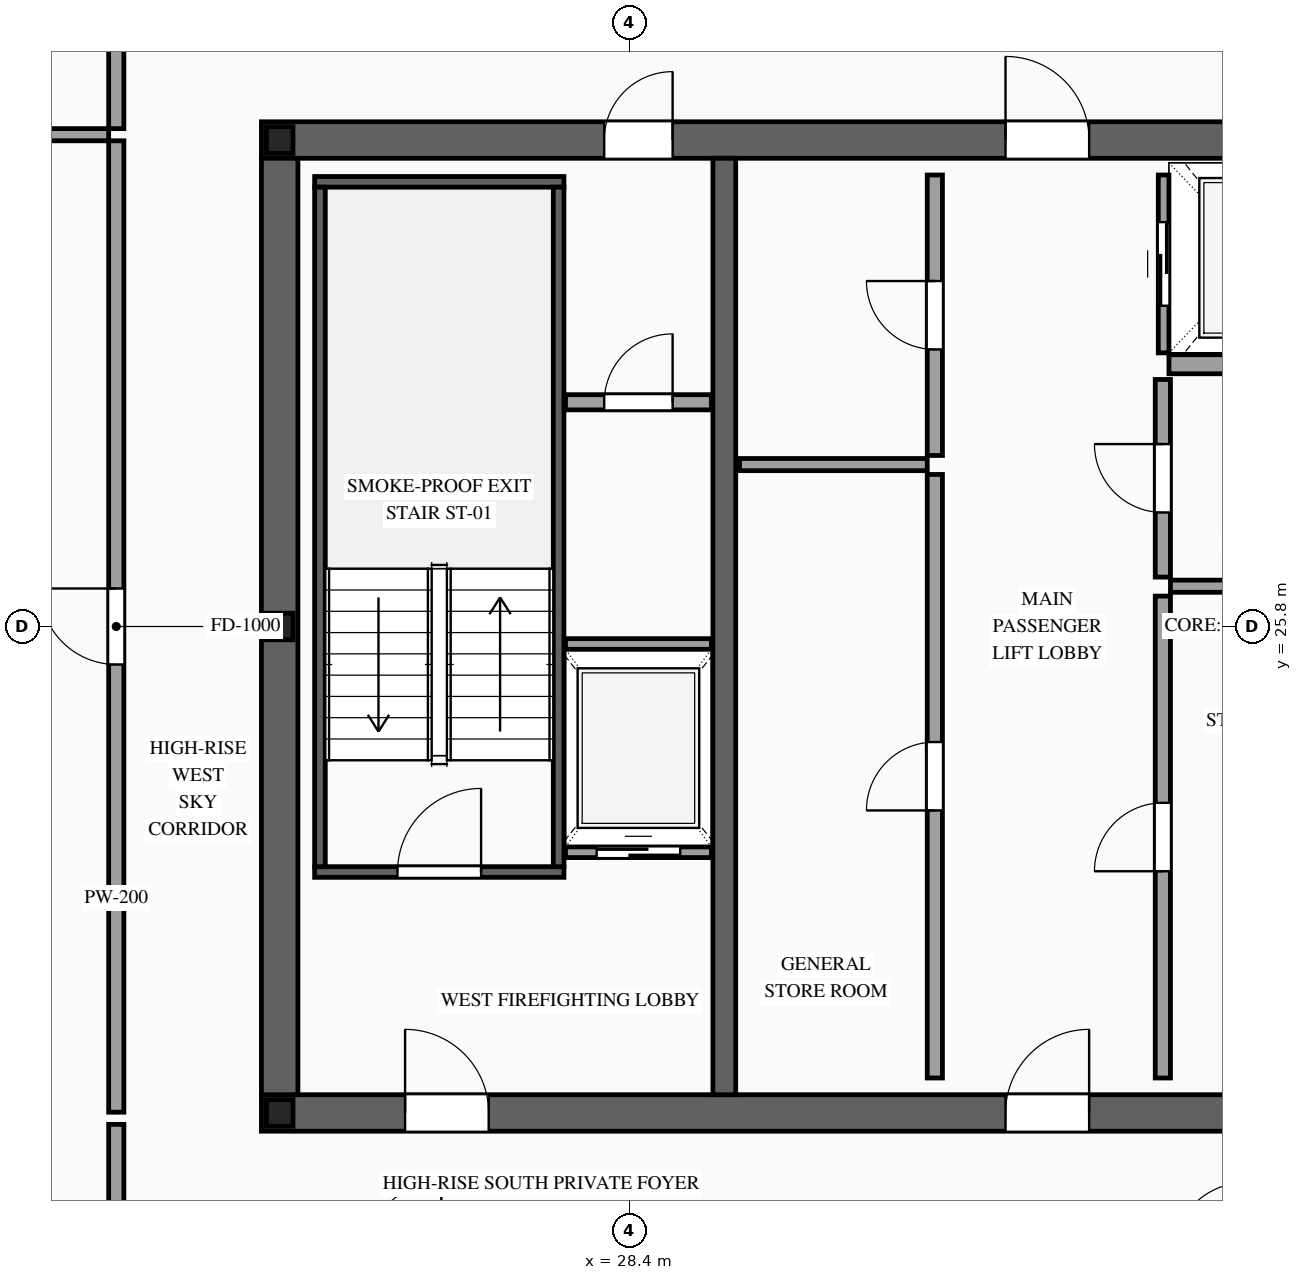
"""IFC4 building model, lengths in metres.
Left out: names, types, materials, properties, quantities, classifications, styles, units other than length and angle.
Written with IfcOpenShell. Run it as: python <this file> out.ifc"""

import sys

from ifc_helpers import new_model, si_unit, direction, frame, frame_2d, origin, origin_2d, place, context, subcontext, project, spatial, rectangle, i_section, extrude, source, transform, mapped, element, fill, save


model = new_model("IFC4")
c1 = context("Model", 3, precision=1e-05, world=origin(), true_north=direction((0.0, 1.0)))
c2 = subcontext(c1, "Body", "Model", "MODEL_VIEW")
j1 = project(units=[si_unit("LENGTHUNIT", "METRE"), si_unit("PLANEANGLEUNIT", "RADIAN")], contexts=[c1])
p1 = place(None, origin())
s1 = spatial("IfcSite", under=j1, at=p1, CompositionType="ELEMENT")
p2 = place(p1, origin())
s2 = spatial("IfcBuilding", under=s1, at=p2, CompositionType="ELEMENT")
p3 = place(p2, frame((0.0, 0.0, 318.2)))
s3 = spatial("IfcBuildingStorey", under=s2, at=p3, CompositionType="ELEMENT", Elevation=318.2)
p4 = place(p3, frame((23.56, 19.4, 0.0), z_axis=(0.0, 0.0, 1.0), x_axis=(1.0, 0.0, 0.0)))
e1 = element("IfcWall", 1, at=p4, inside=s3, PredefinedType="SHEAR", context=c2, shape_type="SweptSolid", body=[
    extrude(rectangle(XDim=26.88, YDim=0.48, at=frame_2d((13.44, 0.0))), origin(), (0.0, 0.0, 1.0), 3.5),
])
p5 = place(p4, frame((1.89, 0.0, 0.0)))
e2 = element("IfcOpeningElement", 2, at=p5, cuts=e1, PredefinedType="OPENING", context=c2, shape_type="SweptSolid", body=[
    extrude(rectangle(XDim=1.1, YDim=2.2, at=frame_2d((0.55, 1.1))), frame((0.0, 0.255, 0.0), z_axis=(0.0, -1.0, 0.0), x_axis=(1.0, 0.0, 0.0)), (0.0, 0.0, 1.0), 0.51),
])
p6 = place(p4, frame((9.79, 0.0, 0.0)))
e3 = element("IfcOpeningElement", 3, at=p6, cuts=e1, PredefinedType="OPENING", context=c2, shape_type="SweptSolid", body=[
    extrude(rectangle(XDim=1.1, YDim=2.2, at=frame_2d((0.55, 1.1))), frame((0.0, 0.255, 0.0), z_axis=(0.0, -1.0, 0.0), x_axis=(1.0, 0.0, 0.0)), (0.0, 0.0, 1.0), 0.51),
])
p7 = place(p4, frame((22.99, 0.0, 0.0)))
e4 = element("IfcOpeningElement", 4, at=p7, cuts=e1, PredefinedType="OPENING", context=c2, shape_type="SweptSolid", body=[
    extrude(rectangle(XDim=1.1, YDim=2.2, at=frame_2d((0.55, 1.1))), frame((0.0, 0.255, 0.0), z_axis=(0.0, -1.0, 0.0), x_axis=(1.0, 0.0, 0.0)), (0.0, 0.0, 1.0), 0.51),
])
p8 = place(p4, frame((19.61, 0.0, 0.0)))
e5 = element("IfcOpeningElement", 5, at=p8, cuts=e1, PredefinedType="OPENING", context=c2, shape_type="SweptSolid", body=[
    extrude(rectangle(XDim=0.9, YDim=2.15, at=frame_2d((0.45, 1.075))), frame((0.0, 0.255, 0.0), z_axis=(0.0, -1.0, 0.0), x_axis=(1.0, 0.0, 0.0)), (0.0, 0.0, 1.0), 0.51),
])
p9 = place(p4, frame((18.17, 0.0, 0.0)))
e6 = element("IfcOpeningElement", 6, at=p9, cuts=e1, PredefinedType="OPENING", context=c2, shape_type="SweptSolid", body=[
    extrude(rectangle(XDim=0.9, YDim=2.15, at=frame_2d((0.45, 1.075))), frame((0.0, 0.255, 0.0), z_axis=(0.0, -1.0, 0.0), x_axis=(1.0, 0.0, 0.0)), (0.0, 0.0, 1.0), 0.51),
])
p10 = place(p3, frame((23.56, 32.2, 0.0), z_axis=(0.0, 0.0, 1.0), x_axis=(1.0, 0.0, 0.0)))
e7 = element("IfcWall", 7, at=p10, inside=s3, PredefinedType="SHEAR", context=c2, shape_type="SweptSolid", body=[
    extrude(rectangle(XDim=26.88, YDim=0.48, at=frame_2d((13.44, 0.0))), origin(), (0.0, 0.0, 1.0), 3.5),
])
p11 = place(p10, frame((4.51, 0.0, 0.0)))
e8 = element("IfcOpeningElement", 8, at=p11, cuts=e7, PredefinedType="OPENING", context=c2, shape_type="SweptSolid", body=[
    extrude(rectangle(XDim=0.9, YDim=2.15, at=frame_2d((0.45, 1.075))), frame((0.0, 0.255, 0.0), z_axis=(0.0, -1.0, 0.0), x_axis=(1.0, 0.0, 0.0)), (0.0, 0.0, 1.0), 0.51),
])
p12 = place(p10, frame((9.79, 0.0, 0.0)))
e9 = element("IfcOpeningElement", 9, at=p12, cuts=e7, PredefinedType="OPENING", context=c2, shape_type="SweptSolid", body=[
    extrude(rectangle(XDim=1.1, YDim=2.2, at=frame_2d((0.55, 1.1))), frame((0.0, 0.255, 0.0), z_axis=(0.0, -1.0, 0.0), x_axis=(1.0, 0.0, 0.0)), (0.0, 0.0, 1.0), 0.51),
])
p13 = place(p10, frame((15.64, 0.0, 0.0)))
e10 = element("IfcOpeningElement", 10, at=p13, cuts=e7, PredefinedType="OPENING", context=c2, shape_type="SweptSolid", body=[
    extrude(rectangle(XDim=1.1, YDim=2.2, at=frame_2d((0.55, 1.1))), frame((0.0, 0.255, 0.0), z_axis=(0.0, -1.0, 0.0), x_axis=(1.0, 0.0, 0.0)), (0.0, 0.0, 1.0), 0.51),
])
p14 = place(p10, frame((18.74, 0.0, 0.0)))
e11 = element("IfcOpeningElement", 11, at=p14, cuts=e7, PredefinedType="OPENING", context=c2, shape_type="SweptSolid", body=[
    extrude(rectangle(XDim=1.1, YDim=2.2, at=frame_2d((0.55, 1.1))), frame((0.0, 0.255, 0.0), z_axis=(0.0, -1.0, 0.0), x_axis=(1.0, 0.0, 0.0)), (0.0, 0.0, 1.0), 0.51),
])
m1 = source(origin(), c2, "Body", "SweptSolid", [
    extrude(rectangle(XDim=12.32, YDim=0.48, at=frame_2d((6.16, 0.0))), origin(), (0.0, 0.0, 1.0), 3.5),
])
p15 = place(p3, frame((23.8, 19.64, 0.0), z_axis=(0.0, 0.0, 1.0), x_axis=(0.0, 1.0, 0.0)))
e12 = element("IfcWall", 12, at=p15, inside=s3, PredefinedType="SHEAR", context=c2, shape_type="MappedRepresentation", body=[
    mapped(m1, transform((0.0, 0.0, 0.0), scale=1.0)),
])
m2 = source(origin(), c2, "Body", "SweptSolid", [
    extrude(rectangle(XDim=12.32, YDim=0.3, at=frame_2d((6.16, 0.0))), origin(), (0.0, 0.0, 1.0), 3.5),
])
p16 = place(p3, frame((29.65, 19.64, 0.0), z_axis=(0.0, 0.0, 1.0), x_axis=(0.0, 1.0, 0.0)))
e13 = element("IfcWall", 13, at=p16, inside=s3, PredefinedType="SOLIDWALL", context=c2, shape_type="MappedRepresentation", body=[
    mapped(m2, transform((0.0, 0.0, 0.0), scale=1.0)),
])
m3 = source(origin(), c2, "Body", "SweptSolid", [
    extrude(i_section(OverallWidth=0.35, OverallDepth=0.35, WebThickness=0.012, FlangeThickness=0.019, at=origin_2d()), origin(), (0.0, 0.0, 1.0), 3.5),
])
for number, where, z_axis, x_axis in (
    (14, (23.8, 19.4, 0.0), (0.0, 0.0, 1.0), (1.0, 0.0, 0.0)),
    (15, (23.8, 25.8, 0.0), (0.0, 0.0, 1.0), (1.0, 0.0, 0.0)),
    (16, (23.8, 32.2, 0.0), (0.0, 0.0, 1.0), (1.0, 0.0, 0.0)),
):
    element("IfcColumn", number, at=place(p3, frame(where, z_axis=z_axis, x_axis=x_axis)), inside=s3, PredefinedType="COLUMN", context=c2, shape_type="MappedRepresentation", body=[
        mapped(m3, transform((0.0, 0.0, 0.0), scale=1.0)),
    ])
p17 = place(p3, frame((27.56, 22.83, 0.0), z_axis=(0.0, 0.0, 1.0), x_axis=(1.0, 0.0, 0.0)))
e17 = element("IfcWall", 17, at=p17, inside=s3, PredefinedType="SOLIDWALL", context=c2, shape_type="SweptSolid", body=[
    extrude(rectangle(XDim=1.92, YDim=0.14, at=frame_2d((0.96, 0.0))), origin(), (0.0, 0.0, 1.0), 3.28),
])
p18 = place(p17, frame((0.41, 0.0, 0.0)))
e18 = element("IfcOpeningElement", 18, at=p18, cuts=e17, PredefinedType="OPENING", context=c2, shape_type="SweptSolid", body=[
    extrude(rectangle(XDim=1.1, YDim=2.2, at=frame_2d((0.55, 1.1))), frame((0.0, 0.085, 0.0), z_axis=(0.0, -1.0, 0.0), x_axis=(1.0, 0.0, 0.0)), (0.0, 0.0, 1.0), 0.17),
])
m4 = source(origin(), c2, "Body", "SweptSolid", [
    extrude(rectangle(XDim=1.92, YDim=0.14, at=frame_2d((0.96, 0.0))), origin(), (0.0, 0.0, 1.0), 3.28),
])
p19 = place(p3, frame((27.56, 25.57, 0.0), z_axis=(0.0, 0.0, 1.0), x_axis=(1.0, 0.0, 0.0)))
e19 = element("IfcWall", 19, at=p19, inside=s3, PredefinedType="SOLIDWALL", context=c2, shape_type="MappedRepresentation", body=[
    mapped(m4, transform((0.0, 0.0, 0.0), scale=1.0)),
])
p20 = place(p3, frame((35.43, 29.4, 0.0), z_axis=(0.0, 0.0, 1.0), x_axis=(0.0, 1.0, 0.0)))
e20 = element("IfcWall", 20, at=p20, inside=s3, PredefinedType="SOLIDWALL", context=c2, shape_type="SweptSolid", body=[
    extrude(rectangle(XDim=2.34, YDim=0.14, at=frame_2d((1.17, 0.0))), origin(), (0.0, 0.0, 1.0), 3.28),
])
p21 = place(p20, frame((0.62, 0.0, 0.0)))
e21 = element("IfcOpeningElement", 21, at=p21, cuts=e20, PredefinedType="OPENING", context=c2, shape_type="SweptSolid", body=[
    extrude(rectangle(XDim=1.1, YDim=2.2, at=frame_2d((0.55, 1.1))), frame((0.0, 0.085, 0.0), z_axis=(0.0, -1.0, 0.0), x_axis=(1.0, 0.0, 0.0)), (0.0, 0.0, 1.0), 0.17),
])
m5 = source(origin(), c2, "Body", "SweptSolid", [
    extrude(rectangle(XDim=2.4, YDim=0.25, at=frame_2d((1.2, 0.0))), origin(), (0.0, 0.0, 1.0), 3.28),
])
p22 = place(p3, frame((35.5, 29.25, 0.0), z_axis=(0.0, 0.0, 1.0), x_axis=(1.0, 0.0, 0.0)))
e22 = element("IfcWall", 22, at=p22, inside=s3, PredefinedType="SOLIDWALL", context=c2, shape_type="MappedRepresentation", body=[
    mapped(m5, transform((0.0, 0.0, 0.0), scale=1.0)),
])
p23 = place(p3, frame((24.26, 22.57, 0.0), z_axis=(0.0, 0.0, 1.0), x_axis=(1.0, 0.0, 0.0)))
e23 = element("IfcWall", 23, at=p23, inside=s3, PredefinedType="SOLIDWALL", context=c2, shape_type="SweptSolid", body=[
    extrude(rectangle(XDim=3.28, YDim=0.14, at=frame_2d((1.64, 0.0))), origin(), (0.0, 0.0, 1.0), 3.28),
])
p24 = place(p23, frame((1.09, 0.0, 0.0)))
e24 = element("IfcOpeningElement", 24, at=p24, cuts=e23, PredefinedType="OPENING", context=c2, shape_type="SweptSolid", body=[
    extrude(rectangle(XDim=1.1, YDim=2.2, at=frame_2d((0.55, 1.1))), frame((0.0, 0.085, 0.0), z_axis=(0.0, -1.0, 0.0), x_axis=(1.0, 0.0, 0.0)), (0.0, 0.0, 1.0), 0.17),
])
m6 = source(origin(), c2, "Body", "SweptSolid", [
    extrude(rectangle(XDim=3.28, YDim=0.14, at=frame_2d((1.64, 0.0))), origin(), (0.0, 0.0, 1.0), 3.28),
])
p25 = place(p3, frame((24.26, 31.65, 0.0), z_axis=(0.0, 0.0, 1.0), x_axis=(1.0, 0.0, 0.0)))
e25 = element("IfcWall", 25, at=p25, inside=s3, PredefinedType="SOLIDWALL", context=c2, shape_type="MappedRepresentation", body=[
    mapped(m6, transform((0.0, 0.0, 0.0), scale=1.0)),
])
m7 = source(origin(), c2, "Body", "SweptSolid", [
    extrude(rectangle(XDim=8.94, YDim=0.14, at=frame_2d((4.47, 0.0))), origin(), (0.0, 0.0, 1.0), 3.28),
])
for number, where, z_axis, x_axis in (
    (26, (24.33, 22.64, 0.0), (0.0, 0.0, 1.0), (0.0, 1.0, 0.0)),
    (27, (27.47, 22.64, 0.0), (0.0, 0.0, 1.0), (0.0, 1.0, 0.0)),
):
    element("IfcWall", number, at=place(p3, frame(where, z_axis=z_axis, x_axis=x_axis)), inside=s3, PredefinedType="SOLIDWALL", context=c2, shape_type="MappedRepresentation", body=[
        mapped(m7, transform((0.0, 0.0, 0.0), scale=1.0)),
    ])
p26 = place(p3, frame((27.56, 28.75, 0.0), z_axis=(0.0, 0.0, 1.0), x_axis=(1.0, 0.0, 0.0)))
e28 = element("IfcWall", 28, at=p26, inside=s3, PredefinedType="PARTITIONING", context=c2, shape_type="SweptSolid", body=[
    extrude(rectangle(XDim=1.92, YDim=0.2, at=frame_2d((0.96, 0.0))), origin(), (0.0, 0.0, 1.0), 3.28),
])
p27 = place(p26, frame((0.51, 0.0, 0.0)))
e29 = element("IfcOpeningElement", 29, at=p27, cuts=e28, PredefinedType="OPENING", context=c2, shape_type="SweptSolid", body=[
    extrude(rectangle(XDim=0.9, YDim=2.15, at=frame_2d((0.45, 1.075))), frame((0.0, 0.115, 0.0), z_axis=(0.0, -1.0, 0.0), x_axis=(1.0, 0.0, 0.0)), (0.0, 0.0, 1.0), 0.23),
])
p28 = place(p3, frame((32.42, 19.86, 0.0), z_axis=(0.0, 0.0, 1.0), x_axis=(0.0, 1.0, 0.0)))
e30 = element("IfcWall", 30, at=p28, inside=s3, PredefinedType="PARTITIONING", context=c2, shape_type="SweptSolid", body=[
    extrude(rectangle(XDim=7.94, YDim=0.2, at=frame_2d((3.97, 0.0))), origin(), (0.0, 0.0, 1.0), 3.28),
])
p29 = place(p28, frame((3.52, 0.0, 0.0)))
e31 = element("IfcOpeningElement", 31, at=p29, cuts=e30, PredefinedType="OPENING", context=c2, shape_type="SweptSolid", body=[
    extrude(rectangle(XDim=0.9, YDim=2.15, at=frame_2d((0.45, 1.075))), frame((0.0, 0.115, 0.0), z_axis=(0.0, -1.0, 0.0), x_axis=(1.0, 0.0, 0.0)), (0.0, 0.0, 1.0), 0.23),
])
p30 = place(p3, frame((32.42, 28.05, 0.0), z_axis=(0.0, 0.0, 1.0), x_axis=(0.0, 1.0, 0.0)))
e32 = element("IfcWall", 32, at=p30, inside=s3, PredefinedType="PARTITIONING", context=c2, shape_type="SweptSolid", body=[
    extrude(rectangle(XDim=3.69, YDim=0.2, at=frame_2d((1.845, 0.0))), origin(), (0.0, 0.0, 1.0), 3.28),
])
p31 = place(p30, frame((1.395, 0.0, 0.0)))
e33 = element("IfcOpeningElement", 33, at=p31, cuts=e32, PredefinedType="OPENING", context=c2, shape_type="SweptSolid", body=[
    extrude(rectangle(XDim=0.9, YDim=2.15, at=frame_2d((0.45, 1.075))), frame((0.0, 0.115, 0.0), z_axis=(0.0, -1.0, 0.0), x_axis=(1.0, 0.0, 0.0)), (0.0, 0.0, 1.0), 0.23),
])
m8 = source(origin(), c2, "Body", "SweptSolid", [
    extrude(rectangle(XDim=2.47, YDim=0.16, at=frame_2d((1.235, 0.0))), origin(), (0.0, 0.0, 1.0), 3.28),
])
p32 = place(p3, frame((29.85, 27.93, 0.0), z_axis=(0.0, 0.0, 1.0), x_axis=(1.0, 0.0, 0.0)))
e34 = element("IfcWall", 34, at=p32, inside=s3, PredefinedType="PARTITIONING", context=c2, shape_type="MappedRepresentation", body=[
    mapped(m8, transform((0.0, 0.0, 0.0), scale=1.0)),
])
p33 = place(p3, frame((35.42, 19.86, 0.0), z_axis=(0.0, 0.0, 1.0), x_axis=(0.0, 1.0, 0.0)))
e35 = element("IfcWall", 35, at=p33, inside=s3, PredefinedType="PARTITIONING", context=c2, shape_type="SweptSolid", body=[
    extrude(rectangle(XDim=6.34, YDim=0.2, at=frame_2d((3.17, 0.0))), origin(), (0.0, 0.0, 1.0), 3.28),
])
p34 = place(p33, frame((2.72, 0.0, 0.0)))
e36 = element("IfcOpeningElement", 36, at=p34, cuts=e35, PredefinedType="OPENING", context=c2, shape_type="SweptSolid", body=[
    extrude(rectangle(XDim=0.9, YDim=2.15, at=frame_2d((0.45, 1.075))), frame((0.0, 0.115, 0.0), z_axis=(0.0, -1.0, 0.0), x_axis=(1.0, 0.0, 0.0)), (0.0, 0.0, 1.0), 0.23),
])
p35 = place(p3, frame((35.42, 26.45, 0.0), z_axis=(0.0, 0.0, 1.0), x_axis=(0.0, 1.0, 0.0)))
e37 = element("IfcWall", 37, at=p35, inside=s3, PredefinedType="PARTITIONING", context=c2, shape_type="SweptSolid", body=[
    extrude(rectangle(XDim=2.6, YDim=0.2, at=frame_2d((1.3, 0.0))), origin(), (0.0, 0.0, 1.0), 3.28),
])
p36 = place(p35, frame((0.85, 0.0, 0.0)))
e38 = element("IfcOpeningElement", 38, at=p36, cuts=e37, PredefinedType="OPENING", context=c2, shape_type="SweptSolid", body=[
    extrude(rectangle(XDim=0.9, YDim=2.15, at=frame_2d((0.45, 1.075))), frame((0.0, 0.115, 0.0), z_axis=(0.0, -1.0, 0.0), x_axis=(1.0, 0.0, 0.0)), (0.0, 0.0, 1.0), 0.23),
])
m9 = source(origin(), c2, "Body", "SweptSolid", [
    extrude(rectangle(XDim=2.36, YDim=0.16, at=frame_2d((1.18, 0.0))), origin(), (0.0, 0.0, 1.0), 3.28),
])
p37 = place(p3, frame((35.52, 26.33, 0.0), z_axis=(0.0, 0.0, 1.0), x_axis=(1.0, 0.0, 0.0)))
e39 = element("IfcWall", 39, at=p37, inside=s3, PredefinedType="PARTITIONING", context=c2, shape_type="MappedRepresentation", body=[
    mapped(m9, transform((0.0, 0.0, 0.0), scale=1.0)),
])
m10 = source(origin(), c2, "Body", "SweptSolid", [
    extrude(rectangle(XDim=1.7, YDim=0.2, at=frame_2d((0.85, 0.0))), origin(), (0.0, 0.0, 1.0), 3.28),
])
for number, where, z_axis, x_axis in (
    (40, (21.65, 32.35, 0.0), (0.0, 0.0, 1.0), (0.0, 1.0, 0.0)),
    (41, (21.65, 17.55, 0.0), (0.0, 0.0, 1.0), (0.0, 1.0, 0.0)),
):
    element("IfcWall", number, at=place(p3, frame(where, z_axis=z_axis, x_axis=x_axis)), inside=s3, PredefinedType="PARTITIONING", context=c2, shape_type="MappedRepresentation", body=[
        mapped(m10, transform((0.0, 0.0, 0.0), scale=1.0)),
    ])
p38 = place(p3, frame((21.65, 19.41, 0.0), z_axis=(0.0, 0.0, 1.0), x_axis=(0.0, 1.0, 0.0)))
e42 = element("IfcWall", 42, at=p38, inside=s3, PredefinedType="PARTITIONING", context=c2, shape_type="SweptSolid", body=[
    extrude(rectangle(XDim=12.78, YDim=0.2, at=frame_2d((6.39, 0.0))), origin(), (0.0, 0.0, 1.0), 3.28),
])
p39 = place(p38, frame((5.89, 0.0, 0.0)))
e43 = element("IfcOpeningElement", 43, at=p39, cuts=e42, PredefinedType="OPENING", context=c2, shape_type="SweptSolid", body=[
    extrude(rectangle(XDim=1.0, YDim=2.2, at=frame_2d((0.5, 1.1))), frame((0.0, 0.115, 0.0), z_axis=(0.0, -1.0, 0.0), x_axis=(1.0, 0.0, 0.0)), (0.0, 0.0, 1.0), 0.23),
])
m11 = source(origin(), c2, "Body", "SweptSolid", [
    extrude(rectangle(XDim=3.5, YDim=0.16, at=frame_2d((1.75, 0.0))), origin(), (0.0, 0.0, 1.0), 2.825),
])
p40 = place(p3, frame((18.05, 32.27, 0.0), z_axis=(0.0, 0.0, 1.0), x_axis=(1.0, 0.0, 0.0)))
e44 = element("IfcWall", 44, at=p40, inside=s3, PredefinedType="PARTITIONING", context=c2, shape_type="MappedRepresentation", body=[
    mapped(m11, transform((0.0, 0.0, 0.0), scale=1.0)),
])
m12 = source(origin(), c2, "Body", "SweptSolid", [
    extrude(rectangle(XDim=1.1, YDim=2.2, at=frame_2d((0.55, 1.1))), frame((0.0, 0.025, 0.0), z_axis=(0.0, -1.0, 0.0), x_axis=(1.0, 0.0, 0.0)), (0.0, 0.0, 1.0), 0.05),
])
p41 = place(p18, origin())
e45 = element("IfcDoor", 45, at=p41, inside=s3, OperationType="SLIDING_TO_LEFT", PredefinedType="DOOR", context=c2, shape_type="MappedRepresentation", body=[
    mapped(m12, transform((0.0, 0.0, 0.0), scale=1.0)),
])
fill(e18, e45)
p42 = place(p21, origin())
e46 = element("IfcDoor", 46, at=p42, inside=s3, OperationType="SLIDING_TO_RIGHT", PredefinedType="DOOR", context=c2, shape_type="MappedRepresentation", body=[
    mapped(m12, transform((0.0, 0.0, 0.0), scale=1.0)),
])
fill(e21, e46)
m13 = source(origin(), c2, "Body", "SweptSolid", [
    extrude(rectangle(XDim=1.1, YDim=2.2, at=frame_2d((0.55, 1.1))), frame((0.0, 0.025, 0.0), z_axis=(0.0, -1.0, 0.0), x_axis=(1.0, 0.0, 0.0)), (0.0, 0.0, 1.0), 0.05),
])
p43 = place(p24, origin())
e47 = element("IfcDoor", 47, at=p43, inside=s3, OperationType="SINGLE_SWING_RIGHT", PredefinedType="DOOR", context=c2, shape_type="MappedRepresentation", body=[
    mapped(m13, transform((0.0, 0.0, 0.0), scale=1.0)),
])
fill(e24, e47)
p44 = place(p5, origin())
e48 = element("IfcDoor", 48, at=p44, inside=s3, OperationType="SINGLE_SWING_LEFT", PredefinedType="DOOR", context=c2, shape_type="MappedRepresentation", body=[
    mapped(m13, transform((0.0, 0.0, 0.0), scale=1.0)),
])
fill(e2, e48)
p45 = place(p6, origin())
e49 = element("IfcDoor", 49, at=p45, inside=s3, OperationType="SINGLE_SWING_RIGHT", PredefinedType="DOOR", context=c2, shape_type="MappedRepresentation", body=[
    mapped(m13, transform((0.0, 0.0, 0.0), scale=1.0)),
])
fill(e3, e49)
m14 = source(origin(), c2, "Body", "SweptSolid", [
    extrude(rectangle(XDim=0.9, YDim=2.15, at=frame_2d((0.45, 1.075))), frame((0.0, 0.025, 0.0), z_axis=(0.0, -1.0, 0.0), x_axis=(1.0, 0.0, 0.0)), (0.0, 0.0, 1.0), 0.05),
])
p46 = place(p11, origin())
e50 = element("IfcDoor", 50, at=p46, inside=s3, OperationType="SINGLE_SWING_RIGHT", PredefinedType="DOOR", context=c2, shape_type="MappedRepresentation", body=[
    mapped(m14, transform((0.0, 0.0, 0.0), scale=1.0)),
])
fill(e8, e50)
p47 = place(p12, origin())
e51 = element("IfcDoor", 51, at=p47, inside=s3, OperationType="SINGLE_SWING_LEFT", PredefinedType="DOOR", context=c2, shape_type="MappedRepresentation", body=[
    mapped(m13, transform((0.0, 0.0, 0.0), scale=1.0)),
])
fill(e9, e51)
p48 = place(p27, origin())
e52 = element("IfcDoor", 52, at=p48, inside=s3, OperationType="SINGLE_SWING_RIGHT", PredefinedType="DOOR", context=c2, shape_type="MappedRepresentation", body=[
    mapped(m14, transform((0.0, 0.0, 0.0), scale=1.0)),
])
fill(e29, e52)
p49 = place(p29, origin())
e53 = element("IfcDoor", 53, at=p49, inside=s3, OperationType="SINGLE_SWING_LEFT", PredefinedType="DOOR", context=c2, shape_type="MappedRepresentation", body=[
    mapped(m14, transform((0.0, 0.0, 0.0), scale=1.0)),
])
fill(e31, e53)
p50 = place(p31, origin())
e54 = element("IfcDoor", 54, at=p50, inside=s3, OperationType="SINGLE_SWING_RIGHT", PredefinedType="DOOR", context=c2, shape_type="MappedRepresentation", body=[
    mapped(m14, transform((0.0, 0.0, 0.0), scale=1.0)),
])
fill(e33, e54)
p51 = place(p34, origin())
e55 = element("IfcDoor", 55, at=p51, inside=s3, OperationType="SINGLE_SWING_LEFT", PredefinedType="DOOR", context=c2, shape_type="MappedRepresentation", body=[
    mapped(m14, transform((0.0, 0.0, 0.0), scale=1.0)),
])
fill(e36, e55)
p52 = place(p36, origin())
e56 = element("IfcDoor", 56, at=p52, inside=s3, OperationType="SINGLE_SWING_RIGHT", PredefinedType="DOOR", context=c2, shape_type="MappedRepresentation", body=[
    mapped(m14, transform((0.0, 0.0, 0.0), scale=1.0)),
])
fill(e38, e56)
m15 = source(origin(), c2, "Body", "SweptSolid", [
    extrude(rectangle(XDim=1.0, YDim=2.2, at=frame_2d((0.5, 1.1))), frame((0.0, 0.025, 0.0), z_axis=(0.0, -1.0, 0.0), x_axis=(1.0, 0.0, 0.0)), (0.0, 0.0, 1.0), 0.05),
])
p53 = place(p39, origin())
e57 = element("IfcDoor", 57, at=p53, inside=s3, OperationType="SINGLE_SWING_RIGHT", PredefinedType="DOOR", context=c2, shape_type="MappedRepresentation", body=[
    mapped(m15, transform((0.0, 0.0, 0.0), scale=1.0)),
])
fill(e43, e57)
save(model, sys.argv[1])
